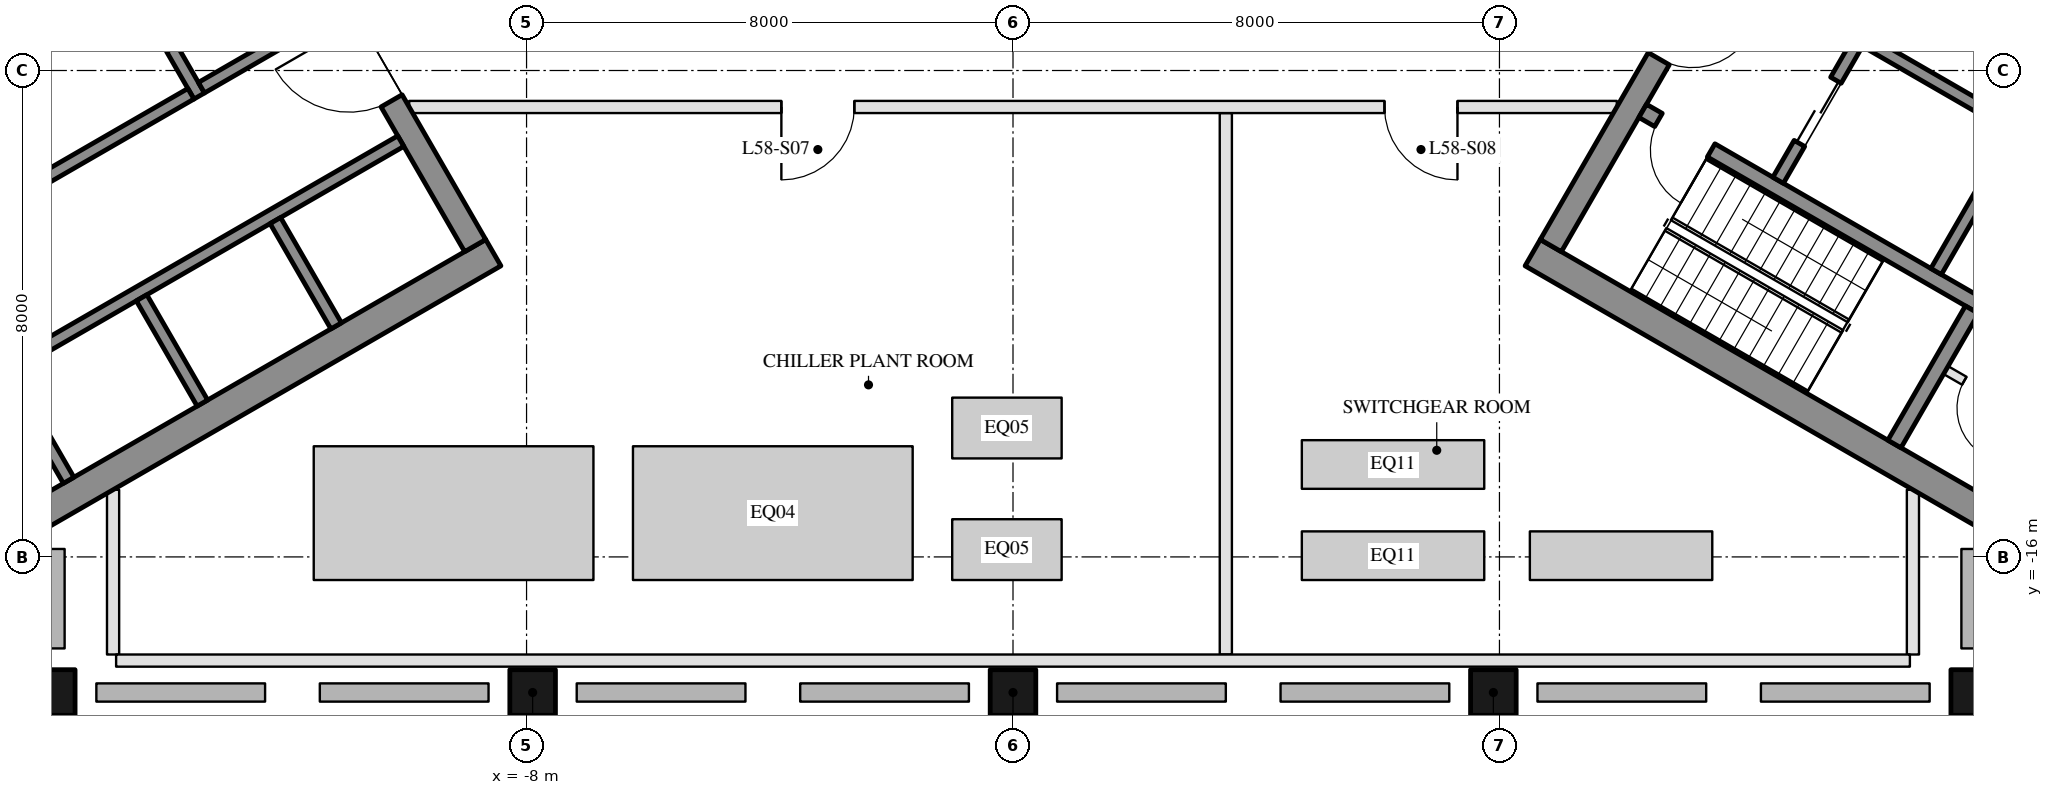
"""IFC4 building model, lengths in metres.
Left out: names, types, materials, properties, quantities, classifications, styles, units other than length and angle.
Written with IfcOpenShell. Run it as: python <this file> out.ifc"""

import sys

from ifc_helpers import new_model, si_unit, direction, frame, frame_2d, origin, origin_2d, place, context, subcontext, project, spatial, rectangle, hollow_rectangle, extrude, element, fill, save


model = new_model("IFC4")
c1 = context("Model", 3, precision=1e-05, world=origin(), true_north=direction((0.0, 1.0)))
c2 = subcontext(c1, "Body", "Model", "MODEL_VIEW")
j1 = project(units=[si_unit("LENGTHUNIT", "METRE"), si_unit("PLANEANGLEUNIT", "RADIAN")], contexts=[c1])
p1 = place(None, origin())
s1 = spatial("IfcSite", under=j1, at=p1, CompositionType="ELEMENT")
p2 = place(p1, origin())
s2 = spatial("IfcBuilding", under=s1, at=p2, CompositionType="ELEMENT")
p3 = place(p2, frame((0.0, 0.0, 237.7)))
s3 = spatial("IfcBuildingStorey", under=s2, at=p3, CompositionType="ELEMENT", Elevation=237.7)
for number, where, z_axis, x_axis in (
    (1, (-15.8, -18.23, 0.0), (0.0, 0.0, 1.0), (-1.0, 0.0, 0.0)),
    (2, (-7.9, -18.23, 0.0), (0.0, 0.0, 1.0), (-1.0, 0.0, 0.0)),
    (3, (0.0, -18.23, 0.0), (0.0, 0.0, 1.0), (-1.0, 0.0, 0.0)),
    (4, (7.9, -18.23, 0.0), (0.0, 0.0, 1.0), (-1.0, 0.0, 0.0)),
    (5, (15.8, -18.23, 0.0), (0.0, 0.0, 1.0), (-1.0, 0.0, 0.0)),
):
    element("IfcColumn", number, at=place(p3, frame(where, z_axis=z_axis, x_axis=x_axis)), inside=s3, PredefinedType="COLUMN", context=c2, shape_type="SweptSolid", body=[
        extrude(hollow_rectangle(XDim=0.75, YDim=0.75, WallThickness=0.035, at=origin_2d()), origin(), (0.0, 0.0, 1.0), 4.5),
    ])
for number, where, z_axis, x_axis in (
    (6, (-13.797, -1.903, 0.0), (0.0, 0.0, 1.0), (-0.866, -0.5, 0.0)),
    (7, (-8.547, -10.997, 0.0), (0.0, 0.0, 1.0), (-0.866, -0.5, 0.0)),
):
    element("IfcWall", number, at=place(p3, frame(where, z_axis=z_axis, x_axis=x_axis)), inside=s3, PredefinedType="SHEAR", context=c2, shape_type="SweptSolid", body=[
        extrude(rectangle(XDim=14.837, YDim=0.5, at=frame_2d((7.418, 0.0))), origin(), (0.0, 0.0, 1.0), 4.2),
    ])
p4 = place(p3, frame((-13.845, -2.22, 0.0), z_axis=(0.0, 0.0, 1.0), x_axis=(0.500004234368, -0.866022959057, 0.0)))
e8 = element("IfcWall", 8, at=p4, inside=s3, PredefinedType="SHEAR", context=c2, shape_type="SweptSolid", body=[
    extrude(rectangle(XDim=10.0, YDim=0.4, at=frame_2d((5.0, 0.0))), origin(), (0.0, 0.0, 1.0), 4.2),
])
p5 = place(p4, frame((3.55, 0.0, 0.0)))
e9 = element("IfcOpeningElement", 9, at=p5, cuts=e8, PredefinedType="OPENING", context=c2, shape_type="SweptSolid", body=[
    extrude(rectangle(XDim=1.1, YDim=2.1, at=frame_2d((0.55, 1.05))), frame((0.0, 0.21, 0.0), z_axis=(0.0, -1.0, 0.0), x_axis=(1.0, 0.0, 0.0)), (0.0, 0.0, 1.0), 0.42),
])
p6 = place(p4, frame((5.85, 0.0, 0.0)))
e10 = element("IfcOpeningElement", 10, at=p6, cuts=e8, PredefinedType="OPENING", context=c2, shape_type="SweptSolid", body=[
    extrude(rectangle(XDim=1.4, YDim=2.1, at=frame_2d((0.7, 1.05))), frame((0.0, 0.21, 0.0), z_axis=(0.0, -1.0, 0.0), x_axis=(1.0, 0.0, 0.0)), (0.0, 0.0, 1.0), 0.42),
])
p7 = place(p3, frame((-12.681, -4.636, 0.0), z_axis=(0.0, 0.0, 1.0), x_axis=(-0.866021702275, -0.500006411147, 0.0)))
e11 = element("IfcWall", 11, at=p7, inside=s3, PredefinedType="SHEAR", context=c2, shape_type="SweptSolid", body=[
    extrude(rectangle(XDim=6.45, YDim=0.25, at=frame_2d((3.225, 0.0))), origin(), (0.0, 0.0, 1.0), 4.2),
])
p8 = place(p7, frame((0.3, 0.0, 0.0)))
e12 = element("IfcOpeningElement", 12, at=p8, cuts=e11, PredefinedType="OPENING", context=c2, shape_type="SweptSolid", body=[
    extrude(rectangle(XDim=1.0, YDim=2.1, at=frame_2d((0.5, 1.05))), frame((0.0, 0.135, 0.0), z_axis=(0.0, -1.0, 0.0), x_axis=(1.0, 0.0, 0.0)), (0.0, 0.0, 1.0), 0.27),
])
p9 = place(p3, frame((-14.783, -5.995, 0.0), z_axis=(0.0, 0.0, 1.0), x_axis=(0.49994636267, -0.866056369097, 0.0)))
e13 = element("IfcWall", 13, at=p9, inside=s3, PredefinedType="SHEAR", context=c2, shape_type="SweptSolid", body=[
    extrude(rectangle(XDim=2.8, YDim=0.2, at=frame_2d((1.4, 0.0))), origin(), (0.0, 0.0, 1.0), 4.2),
])
p10 = place(p9, frame((0.7, 0.0, 0.0)))
e14 = element("IfcOpeningElement", 14, at=p10, cuts=e13, PredefinedType="OPENING", context=c2, shape_type="SweptSolid", body=[
    extrude(rectangle(XDim=1.2, YDim=2.1, at=frame_2d((0.6, 1.05))), frame((0.0, 0.11, 0.0), z_axis=(0.0, -1.0, 0.0), x_axis=(1.0, 0.0, 0.0)), (0.0, 0.0, 1.0), 0.22),
])
p11 = place(p3, frame((-13.52, -8.383, 0.0), z_axis=(0.0, 0.0, 1.0), x_axis=(-0.866034573852, -0.49998411664, 0.0)))
e15 = element("IfcWall", 15, at=p11, inside=s3, PredefinedType="SHEAR", context=c2, shape_type="SweptSolid", body=[
    extrude(rectangle(XDim=2.8, YDim=0.2, at=frame_2d((1.4, 0.0))), origin(), (0.0, 0.0, 1.0), 4.2),
])
p12 = place(p3, frame((-11.268, -7.083, 0.0), z_axis=(0.0, 0.0, 1.0), x_axis=(-0.866050077142, -0.499957262057, 0.0)))
e16 = element("IfcWall", 16, at=p12, inside=s3, PredefinedType="SHEAR", context=c2, shape_type="SweptSolid", body=[
    extrude(rectangle(XDim=2.4, YDim=0.2, at=frame_2d((1.2, 0.0))), origin(), (0.0, 0.0, 1.0), 4.2),
])
p13 = place(p3, frame((-10.068, -9.162, 0.0), z_axis=(0.0, 0.0, 1.0), x_axis=(-0.866032725843, -0.499987317609, 0.0)))
e17 = element("IfcWall", 17, at=p13, inside=s3, PredefinedType="SHEAR", context=c2, shape_type="SweptSolid", body=[
    extrude(rectangle(XDim=10.16, YDim=0.2, at=frame_2d((5.08, 0.0))), origin(), (0.0, 0.0, 1.0), 4.2),
])
for number, where, z_axis, x_axis in (
    (18, (-12.131, -10.468, 0.0), (0.0, 0.0, 1.0), (0.5, -0.866, 0.0)),
    (19, (-14.331, -11.738, 0.0), (0.0, 0.0, 1.0), (0.5, -0.866, 0.0)),
    (20, (-16.531, -13.008, 0.0), (0.0, 0.0, 1.0), (0.5, -0.866, 0.0)),
):
    element("IfcWall", number, at=place(p3, frame(where, z_axis=z_axis, x_axis=x_axis)), inside=s3, PredefinedType="SHEAR", context=c2, shape_type="SweptSolid", body=[
        extrude(rectangle(XDim=2.0, YDim=0.2, at=frame_2d((1.0, 0.0))), origin(), (0.0, 0.0, 1.0), 4.2),
    ])
for number, where, z_axis, x_axis in (
    (21, (8.547, -10.997, 0.0), (0.0, 0.0, 1.0), (0.866, -0.5, 0.0)),
    (22, (13.797, -1.903, 0.0), (0.0, 0.0, 1.0), (0.866, -0.5, 0.0)),
):
    element("IfcWall", number, at=place(p3, frame(where, z_axis=z_axis, x_axis=x_axis)), inside=s3, PredefinedType="SHEAR", context=c2, shape_type="SweptSolid", body=[
        extrude(rectangle(XDim=14.837, YDim=0.5, at=frame_2d((7.418, 0.0))), origin(), (0.0, 0.0, 1.0), 4.2),
    ])
p14 = place(p3, frame((8.845, -10.88, 0.0), z_axis=(0.0, 0.0, 1.0), x_axis=(0.500004234368, 0.866022959057, 0.0)))
e23 = element("IfcWall", 23, at=p14, inside=s3, PredefinedType="SHEAR", context=c2, shape_type="SweptSolid", body=[
    extrude(rectangle(XDim=10.0, YDim=0.4, at=frame_2d((5.0, 0.0))), origin(), (0.0, 0.0, 1.0), 4.2),
])
p15 = place(p14, frame((3.55, 0.0, 0.0)))
e24 = element("IfcOpeningElement", 24, at=p15, cuts=e23, PredefinedType="OPENING", context=c2, shape_type="SweptSolid", body=[
    extrude(rectangle(XDim=1.1, YDim=2.1, at=frame_2d((0.55, 1.05))), frame((0.0, 0.21, 0.0), z_axis=(0.0, -1.0, 0.0), x_axis=(1.0, 0.0, 0.0)), (0.0, 0.0, 1.0), 0.42),
])
p16 = place(p14, frame((5.85, 0.0, 0.0)))
e25 = element("IfcOpeningElement", 25, at=p16, cuts=e23, PredefinedType="OPENING", context=c2, shape_type="SweptSolid", body=[
    extrude(rectangle(XDim=1.4, YDim=2.1, at=frame_2d((0.7, 1.05))), frame((0.0, 0.21, 0.0), z_axis=(0.0, -1.0, 0.0), x_axis=(1.0, 0.0, 0.0)), (0.0, 0.0, 1.0), 0.42),
])
p17 = place(p3, frame((10.356, -8.664, 0.0), z_axis=(0.0, 0.0, 1.0), x_axis=(0.866028629588, -0.499994412703, 0.0)))
e26 = element("IfcWall", 26, at=p17, inside=s3, PredefinedType="SHEAR", context=c2, shape_type="SweptSolid", body=[
    extrude(rectangle(XDim=6.45, YDim=0.25, at=frame_2d((3.225, 0.0))), origin(), (0.0, 0.0, 1.0), 4.2),
])
p18 = place(p17, frame((0.3, 0.0, 0.0)))
e27 = element("IfcOpeningElement", 27, at=p18, cuts=e26, PredefinedType="OPENING", context=c2, shape_type="SweptSolid", body=[
    extrude(rectangle(XDim=1.0, YDim=2.1, at=frame_2d((0.5, 1.05))), frame((0.0, 0.135, 0.0), z_axis=(0.0, -1.0, 0.0), x_axis=(1.0, 0.0, 0.0)), (0.0, 0.0, 1.0), 0.27),
])
p19 = place(p3, frame((14.496, -14.143, 0.0), z_axis=(0.0, 0.0, 1.0), x_axis=(0.500062241894, 0.865989465428, 0.0)))
e28 = element("IfcWall", 28, at=p19, inside=s3, PredefinedType="SHEAR", context=c2, shape_type="SweptSolid", body=[
    extrude(rectangle(XDim=2.55, YDim=0.25, at=frame_2d((1.275, 0.0))), origin(), (0.0, 0.0, 1.0), 4.2),
])
p20 = place(p3, frame((15.181, -11.305, 0.0), z_axis=(0.0, 0.0, 1.0), x_axis=(0.49994636267, 0.866056369097, 0.0)))
e29 = element("IfcWall", 29, at=p20, inside=s3, PredefinedType="SHEAR", context=c2, shape_type="SweptSolid", body=[
    extrude(rectangle(XDim=2.8, YDim=0.2, at=frame_2d((1.4, 0.0))), origin(), (0.0, 0.0, 1.0), 4.2),
])
p21 = place(p3, frame((12.583, -9.805, 0.0), z_axis=(0.0, 0.0, 1.0), x_axis=(0.49994636267, 0.866056369097, 0.0)))
e30 = element("IfcWall", 30, at=p21, inside=s3, PredefinedType="SHEAR", context=c2, shape_type="SweptSolid", body=[
    extrude(rectangle(XDim=2.8, YDim=0.2, at=frame_2d((1.4, 0.0))), origin(), (0.0, 0.0, 1.0), 4.2),
])
p22 = place(p21, frame((0.7, 0.0, 0.0)))
e31 = element("IfcOpeningElement", 31, at=p22, cuts=e30, PredefinedType="OPENING", context=c2, shape_type="SweptSolid", body=[
    extrude(rectangle(XDim=1.2, YDim=2.1, at=frame_2d((0.6, 1.05))), frame((0.0, 0.11, 0.0), z_axis=(0.0, -1.0, 0.0), x_axis=(1.0, 0.0, 0.0)), (0.0, 0.0, 1.0), 0.22),
])
p23 = place(p3, frame((14.02, -7.517, 0.0), z_axis=(0.0, 0.0, 1.0), x_axis=(0.866034573852, -0.49998411664, 0.0)))
e32 = element("IfcWall", 32, at=p23, inside=s3, PredefinedType="SHEAR", context=c2, shape_type="SweptSolid", body=[
    extrude(rectangle(XDim=2.8, YDim=0.2, at=frame_2d((1.4, 0.0))), origin(), (0.0, 0.0, 1.0), 4.2),
])
p24 = place(p3, frame((12.968, -4.138, 0.0), z_axis=(0.0, 0.0, 1.0), x_axis=(0.866028328073, -0.49999493495, 0.0)))
e33 = element("IfcWall", 33, at=p24, inside=s3, PredefinedType="SHEAR", context=c2, shape_type="SweptSolid", body=[
    extrude(rectangle(XDim=10.16, YDim=0.2, at=frame_2d((5.08, 0.0))), origin(), (0.0, 0.0, 1.0), 4.2),
])
p25 = place(p24, frame((5.8, 0.0, 0.0)))
e34 = element("IfcOpeningElement", 34, at=p25, cuts=e33, PredefinedType="OPENING", context=c2, shape_type="SweptSolid", body=[
    extrude(rectangle(XDim=0.9, YDim=2.1, at=frame_2d((0.45, 1.05))), frame((0.0, 0.11, 0.0), z_axis=(0.0, -1.0, 0.0), x_axis=(1.0, 0.0, 0.0)), (0.0, 0.0, 1.0), 0.22),
])
p26 = place(p3, frame((15.342, -12.928, 0.0), z_axis=(0.0, 0.0, 1.0), x_axis=(0.865989903783, -0.500061482766, 0.0)))
e35 = element("IfcWall", 35, at=p26, inside=s3, PredefinedType="PARTITIONING", context=c2, shape_type="SweptSolid", body=[
    extrude(rectangle(XDim=1.6, YDim=0.15, at=frame_2d((0.8, 0.0))), origin(), (0.0, 0.0, 1.0), 4.2),
])
p27 = place(p26, frame((0.35, 0.0, 0.0)))
e36 = element("IfcOpeningElement", 36, at=p27, cuts=e35, PredefinedType="OPENING", context=c2, shape_type="SweptSolid", body=[
    extrude(rectangle(XDim=0.9, YDim=2.1, at=frame_2d((0.45, 1.05))), frame((0.0, 0.085, 0.0), z_axis=(0.0, -1.0, 0.0), x_axis=(1.0, 0.0, 0.0)), (0.0, 0.0, 1.0), 0.17),
])
p28 = place(p3, frame((-14.8, -17.605, 0.0), z_axis=(0.0, 0.0, 1.0), x_axis=(0.0, 1.0, 0.0)))
e37 = element("IfcWall", 37, at=p28, inside=s3, PredefinedType="PARTITIONING", context=c2, shape_type="SweptSolid", body=[
    extrude(rectangle(XDim=2.709, YDim=0.2, at=frame_2d((1.355, 0.0))), origin(), (0.0, 0.0, 1.0), 4.2),
])
p29 = place(p3, frame((3.5, -17.605, 0.0), z_axis=(0.0, 0.0, 1.0), x_axis=(0.0, 1.0, 0.0)))
e38 = element("IfcWall", 38, at=p29, inside=s3, PredefinedType="PARTITIONING", context=c2, shape_type="SweptSolid", body=[
    extrude(rectangle(XDim=8.905, YDim=0.2, at=frame_2d((4.453, 0.0))), origin(), (0.0, 0.0, 1.0), 4.2),
])
p30 = place(p3, frame((14.8, -17.605, 0.0), z_axis=(0.0, 0.0, 1.0), x_axis=(0.0, 1.0, 0.0)))
e39 = element("IfcWall", 39, at=p30, inside=s3, PredefinedType="PARTITIONING", context=c2, shape_type="SweptSolid", body=[
    extrude(rectangle(XDim=2.709, YDim=0.2, at=frame_2d((1.355, 0.0))), origin(), (0.0, 0.0, 1.0), 4.2),
])
p31 = place(p3, frame((-14.75, -17.705, 0.0), z_axis=(0.0, 0.0, 1.0), x_axis=(1.0, 0.0, 0.0)))
e40 = element("IfcWall", 40, at=p31, inside=s3, PredefinedType="PARTITIONING", context=c2, shape_type="SweptSolid", body=[
    extrude(rectangle(XDim=29.5, YDim=0.2, at=frame_2d((14.75, 0.0))), origin(), (0.0, 0.0, 1.0), 3.41),
])
p32 = place(p3, frame((-9.93, -8.6, 0.0), z_axis=(0.0, 0.0, 1.0), x_axis=(1.0, 0.0, 0.0)))
e41 = element("IfcWall", 41, at=p32, inside=s3, PredefinedType="PARTITIONING", context=c2, shape_type="SweptSolid", body=[
    extrude(rectangle(XDim=19.861, YDim=0.2, at=frame_2d((9.93, 0.0))), origin(), (0.0, 0.0, 1.0), 3.41),
])
p33 = place(p32, frame((6.121, 0.0, 0.0)))
e42 = element("IfcOpeningElement", 42, at=p33, cuts=e41, PredefinedType="OPENING", context=c2, shape_type="SweptSolid", body=[
    extrude(rectangle(XDim=1.2, YDim=2.1, at=frame_2d((0.6, 1.05))), frame((0.0, 0.11, 0.0), z_axis=(0.0, -1.0, 0.0), x_axis=(1.0, 0.0, 0.0)), (0.0, 0.0, 1.0), 0.22),
])
p34 = place(p32, frame((16.04, 0.0, 0.0)))
e43 = element("IfcOpeningElement", 43, at=p34, cuts=e41, PredefinedType="OPENING", context=c2, shape_type="SweptSolid", body=[
    extrude(rectangle(XDim=1.2, YDim=2.1, at=frame_2d((0.6, 1.05))), frame((0.0, 0.11, 0.0), z_axis=(0.0, -1.0, 0.0), x_axis=(1.0, 0.0, 0.0)), (0.0, 0.0, 1.0), 0.22),
])
p35 = place(p6, frame((1.4, 0.0, 0.0), z_axis=(0.0, 0.0, 1.0), x_axis=(-1.0, 0.0, 0.0)))
e44 = element("IfcDoor", 44, at=p35, inside=s3, OperationType="DOUBLE_DOOR_SINGLE_SWING", PredefinedType="DOOR", context=c2, shape_type="SweptSolid", body=[
    extrude(rectangle(XDim=1.4, YDim=2.1, at=frame_2d((0.7, 1.05))), frame((0.0, 0.025, 0.0), z_axis=(0.0, -1.0, 0.0), x_axis=(1.0, 0.0, 0.0)), (0.0, 0.0, 1.0), 0.05),
])
fill(e10, e44)
p36 = place(p22, origin())
e45 = element("IfcDoor", 45, at=p36, inside=s3, OperationType="DOUBLE_DOOR_SLIDING", PredefinedType="DOOR", context=c2, shape_type="SweptSolid", body=[
    extrude(rectangle(XDim=1.2, YDim=2.1, at=frame_2d((0.6, 1.05))), frame((0.0, 0.025, 0.0), z_axis=(0.0, -1.0, 0.0), x_axis=(1.0, 0.0, 0.0)), (0.0, 0.0, 1.0), 0.05),
])
fill(e31, e45)
p37 = place(p27, frame((0.9, 0.0, 0.0), z_axis=(0.0, 0.0, 1.0), x_axis=(-1.0, 0.0, 0.0)))
e46 = element("IfcDoor", 46, at=p37, inside=s3, OperationType="SINGLE_SWING_LEFT", PredefinedType="DOOR", context=c2, shape_type="SweptSolid", body=[
    extrude(rectangle(XDim=0.9, YDim=2.1, at=frame_2d((0.45, 1.05))), frame((0.0, 0.025, 0.0), z_axis=(0.0, -1.0, 0.0), x_axis=(1.0, 0.0, 0.0)), (0.0, 0.0, 1.0), 0.05),
])
fill(e36, e46)
p38 = place(p15, frame((1.1, 0.0, 0.0), z_axis=(0.0, 0.0, 1.0), x_axis=(-1.0, 0.0, 0.0)))
e47 = element("IfcDoor", 47, at=p38, inside=s3, OperationType="SINGLE_SWING_LEFT", PredefinedType="DOOR", context=c2, shape_type="SweptSolid", body=[
    extrude(rectangle(XDim=1.1, YDim=2.1, at=frame_2d((0.55, 1.05))), frame((0.0, 0.025, 0.0), z_axis=(0.0, -1.0, 0.0), x_axis=(1.0, 0.0, 0.0)), (0.0, 0.0, 1.0), 0.05),
])
fill(e24, e47)
p39 = place(p18, frame((1.0, 0.0, 0.0), z_axis=(0.0, 0.0, 1.0), x_axis=(-1.0, 0.0, 0.0)))
e48 = element("IfcDoor", 48, at=p39, inside=s3, OperationType="SINGLE_SWING_LEFT", PredefinedType="DOOR", context=c2, shape_type="SweptSolid", body=[
    extrude(rectangle(XDim=1.0, YDim=2.1, at=frame_2d((0.5, 1.05))), frame((0.0, 0.025, 0.0), z_axis=(0.0, -1.0, 0.0), x_axis=(1.0, 0.0, 0.0)), (0.0, 0.0, 1.0), 0.05),
])
fill(e27, e48)
p40 = place(p33, frame((1.2, 0.0, 0.0), z_axis=(0.0, 0.0, 1.0), x_axis=(-1.0, 0.0, 0.0)))
e49 = element("IfcDoor", 49, at=p40, inside=s3, OperationType="SINGLE_SWING_RIGHT", PredefinedType="DOOR", context=c2, shape_type="SweptSolid", body=[
    extrude(rectangle(XDim=1.2, YDim=2.1, at=frame_2d((0.6, 1.05))), frame((0.0, 0.025, 0.0), z_axis=(0.0, -1.0, 0.0), x_axis=(1.0, 0.0, 0.0)), (0.0, 0.0, 1.0), 0.05),
])
fill(e42, e49)
p41 = place(p34, frame((1.2, 0.0, 0.0), z_axis=(0.0, 0.0, 1.0), x_axis=(-1.0, 0.0, 0.0)))
e50 = element("IfcDoor", 50, at=p41, inside=s3, OperationType="SINGLE_SWING_LEFT", PredefinedType="DOOR", context=c2, shape_type="SweptSolid", body=[
    extrude(rectangle(XDim=1.2, YDim=2.1, at=frame_2d((0.6, 1.05))), frame((0.0, 0.025, 0.0), z_axis=(0.0, -1.0, 0.0), x_axis=(1.0, 0.0, 0.0)), (0.0, 0.0, 1.0), 0.05),
])
fill(e43, e50)
save(model, sys.argv[1])
